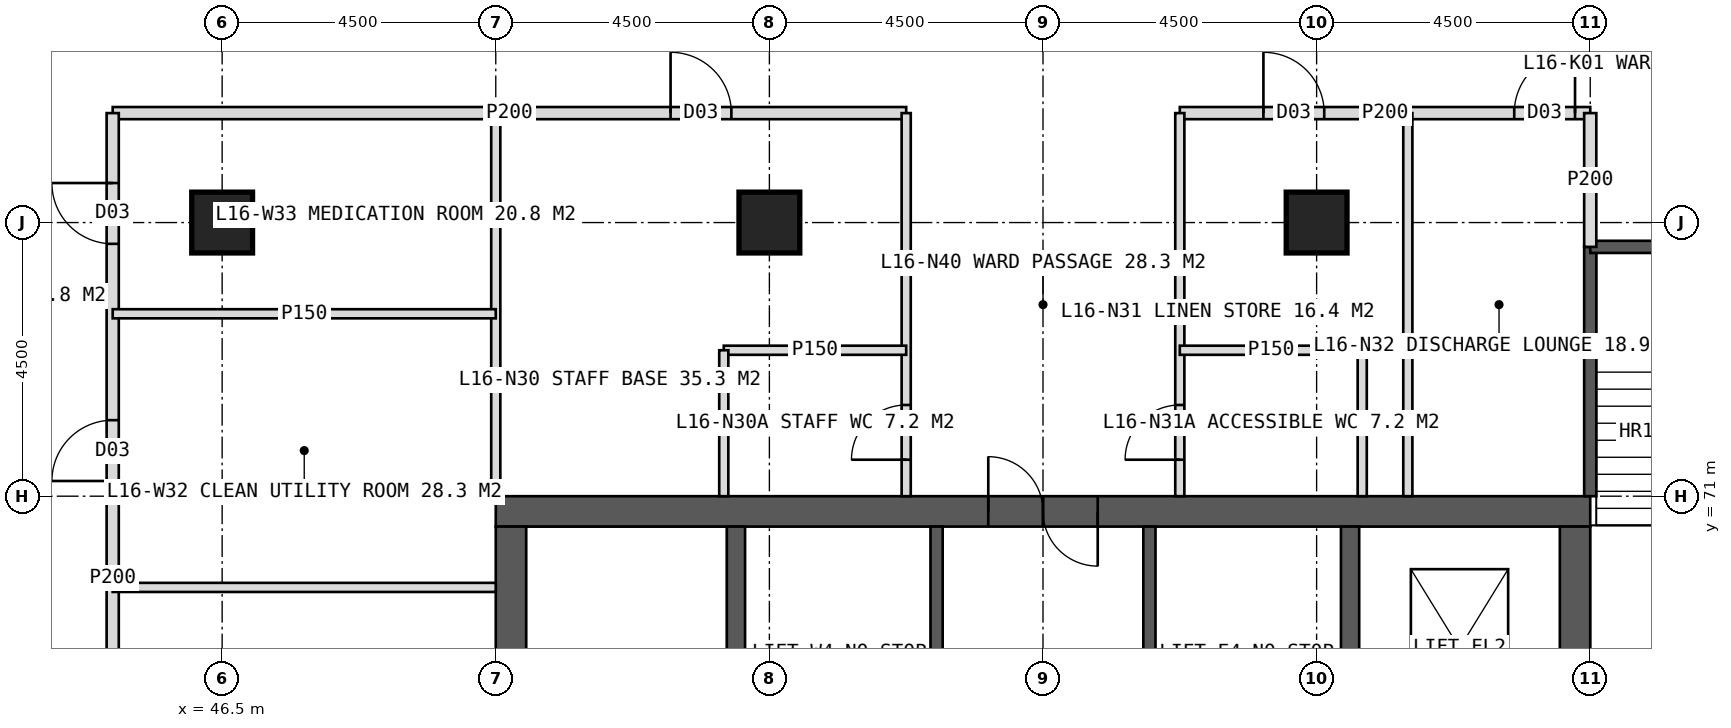
"""IFC4 building model, lengths in metres.
Left out: names, types, materials, properties, quantities, classifications, styles, units other than length and angle.
Written with IfcOpenShell. Run it as: python <this file> out.ifc"""

import sys

from ifc_helpers import new_model, si_unit, direction, frame, frame_2d, origin, origin_2d, place, context, subcontext, project, spatial, rectangle, hollow_rectangle, extrude, element, fill, save


model = new_model("IFC4")
c1 = context("Model", 3, precision=1e-05, world=origin(), true_north=direction((0.0, 1.0)))
c2 = subcontext(c1, "Body", "Model", "MODEL_VIEW")
j1 = project(units=[si_unit("LENGTHUNIT", "METRE"), si_unit("PLANEANGLEUNIT", "RADIAN")], contexts=[c1])
p1 = place(None, origin())
s1 = spatial("IfcSite", under=j1, at=p1, CompositionType="ELEMENT")
p2 = place(p1, origin())
s2 = spatial("IfcBuilding", under=s1, at=p2, CompositionType="ELEMENT")
p3 = place(p2, frame((0.0, 0.0, 71.0)))
s3 = spatial("IfcBuildingStorey", under=s2, at=p3, CompositionType="ELEMENT", Elevation=71.0)
p4 = place(p3, frame((51.0, 70.75, 0.0), z_axis=(0.0, 0.0, 1.0), x_axis=(1.0, 0.0, 0.0)))
e1 = element("IfcWall", 1, at=p4, inside=s3, PredefinedType="SHEAR", context=c2, shape_type="SweptSolid", body=[
    extrude(rectangle(XDim=18.0, YDim=0.5, at=frame_2d((9.0, 0.0))), origin(), (0.0, 0.0, 1.0), 4.0),
])
p5 = place(p4, frame((8.1, 0.0, 0.0)))
e2 = element("IfcOpeningElement", 2, at=p5, cuts=e1, PredefinedType="OPENING", context=c2, shape_type="SweptSolid", body=[
    extrude(rectangle(XDim=1.8, YDim=2.2, at=frame_2d((0.9, 1.1))), frame((0.0, 0.26, 0.0), z_axis=(0.0, -1.0, 0.0), x_axis=(1.0, 0.0, 0.0)), (0.0, 0.0, 1.0), 0.52),
])
p6 = place(p3, frame((51.25, 53.5, 0.0), z_axis=(0.0, 0.0, 1.0), x_axis=(0.0, 1.0, 0.0)))
e3 = element("IfcWall", 3, at=p6, inside=s3, PredefinedType="SHEAR", context=c2, shape_type="SweptSolid", body=[
    extrude(rectangle(XDim=17.0, YDim=0.5, at=frame_2d((8.5, 0.0))), origin(), (0.0, 0.0, 1.0), 4.0),
])
p7 = place(p6, frame((6.0, 0.0, 0.0)))
e4 = element("IfcOpeningElement", 4, at=p7, cuts=e3, PredefinedType="OPENING", context=c2, shape_type="SweptSolid", body=[
    extrude(rectangle(XDim=1.5, YDim=2.2, at=frame_2d((0.75, 1.1))), frame((0.0, 0.26, 0.0), z_axis=(0.0, -1.0, 0.0), x_axis=(1.0, 0.0, 0.0)), (0.0, 0.0, 1.0), 0.52),
])
p8 = place(p3, frame((68.75, 53.5, 0.0), z_axis=(0.0, 0.0, 1.0), x_axis=(0.0, 1.0, 0.0)))
e5 = element("IfcWall", 5, at=p8, inside=s3, PredefinedType="SHEAR", context=c2, shape_type="SweptSolid", body=[
    extrude(rectangle(XDim=17.0, YDim=0.5, at=frame_2d((8.5, 0.0))), origin(), (0.0, 0.0, 1.0), 4.0),
])
p9 = place(p8, frame((9.5, 0.0, 0.0)))
e6 = element("IfcOpeningElement", 6, at=p9, cuts=e5, PredefinedType="OPENING", context=c2, shape_type="SweptSolid", body=[
    extrude(rectangle(XDim=1.5, YDim=2.2, at=frame_2d((0.75, 1.1))), frame((0.0, 0.26, 0.0), z_axis=(0.0, -1.0, 0.0), x_axis=(1.0, 0.0, 0.0)), (0.0, 0.0, 1.0), 0.52),
])
for number, where, z_axis, x_axis in (
    (7, (54.95, 53.5, 0.0), (0.0, 0.0, 1.0), (0.0, 1.0, 0.0)),
    (8, (65.05, 53.5, 0.0), (0.0, 0.0, 1.0), (0.0, 1.0, 0.0)),
):
    element("IfcWall", number, at=place(p3, frame(where, z_axis=z_axis, x_axis=x_axis)), inside=s3, PredefinedType="SHEAR", context=c2, shape_type="SweptSolid", body=[
        extrude(rectangle(XDim=17.0, YDim=0.3, at=frame_2d((8.5, 0.0))), origin(), (0.0, 0.0, 1.0), 4.0),
    ])
p10 = place(p3, frame((58.25, 53.5, 0.0), z_axis=(0.0, 0.0, 1.0), x_axis=(0.0, 1.0, 0.0)))
e9 = element("IfcWall", 9, at=p10, inside=s3, PredefinedType="SHEAR", context=c2, shape_type="SweptSolid", body=[
    extrude(rectangle(XDim=17.0, YDim=0.2, at=frame_2d((8.5, 0.0))), origin(), (0.0, 0.0, 1.0), 4.0),
])
p11 = place(p10, frame((1.375, 0.0, 0.0)))
e10 = element("IfcOpeningElement", 10, at=p11, cuts=e9, PredefinedType="OPENING", context=c2, shape_type="SweptSolid", body=[
    extrude(rectangle(XDim=1.4, YDim=2.2, at=frame_2d((0.7, 1.1))), frame((0.0, 0.11, 0.0), z_axis=(0.0, -1.0, 0.0), x_axis=(1.0, 0.0, 0.0)), (0.0, 0.0, 1.0), 0.22),
])
p12 = place(p10, frame((5.675, 0.0, 0.0)))
e11 = element("IfcOpeningElement", 11, at=p12, cuts=e9, PredefinedType="OPENING", context=c2, shape_type="SweptSolid", body=[
    extrude(rectangle(XDim=1.4, YDim=2.2, at=frame_2d((0.7, 1.1))), frame((0.0, 0.11, 0.0), z_axis=(0.0, -1.0, 0.0), x_axis=(1.0, 0.0, 0.0)), (0.0, 0.0, 1.0), 0.22),
])
p13 = place(p3, frame((61.75, 53.5, 0.0), z_axis=(0.0, 0.0, 1.0), x_axis=(0.0, 1.0, 0.0)))
e12 = element("IfcWall", 12, at=p13, inside=s3, PredefinedType="SHEAR", context=c2, shape_type="SweptSolid", body=[
    extrude(rectangle(XDim=17.0, YDim=0.2, at=frame_2d((8.5, 0.0))), origin(), (0.0, 0.0, 1.0), 4.0),
])
p14 = place(p13, frame((1.375, 0.0, 0.0)))
e13 = element("IfcOpeningElement", 13, at=p14, cuts=e12, PredefinedType="OPENING", context=c2, shape_type="SweptSolid", body=[
    extrude(rectangle(XDim=1.4, YDim=2.2, at=frame_2d((0.7, 1.1))), frame((0.0, 0.11, 0.0), z_axis=(0.0, -1.0, 0.0), x_axis=(1.0, 0.0, 0.0)), (0.0, 0.0, 1.0), 0.22),
])
p15 = place(p13, frame((5.675, 0.0, 0.0)))
e14 = element("IfcOpeningElement", 14, at=p15, cuts=e12, PredefinedType="OPENING", context=c2, shape_type="SweptSolid", body=[
    extrude(rectangle(XDim=1.4, YDim=2.2, at=frame_2d((0.7, 1.1))), frame((0.0, 0.11, 0.0), z_axis=(0.0, -1.0, 0.0), x_axis=(1.0, 0.0, 0.0)), (0.0, 0.0, 1.0), 0.22),
])
for number, where, z_axis, x_axis in (
    (15, (46.5, 75.5, 0.0), (0.0, 0.0, 1.0), (1.0, 0.0, 0.0)),
    (16, (55.5, 75.5, 0.0), (0.0, 0.0, 1.0), (1.0, 0.0, 0.0)),
    (17, (64.5, 75.5, 0.0), (0.0, 0.0, 1.0), (1.0, 0.0, 0.0)),
):
    element("IfcColumn", number, at=place(p3, frame(where, z_axis=z_axis, x_axis=x_axis)), inside=s3, PredefinedType="COLUMN", context=c2, shape_type="SweptSolid", body=[
        extrude(hollow_rectangle(XDim=1.0, YDim=1.0, WallThickness=0.1, at=origin_2d()), origin(), (0.0, 0.0, 1.0), 4.0),
    ])
p16 = place(p3, frame((51.0, 71.0, 0.0), z_axis=(0.0, 0.0, 1.0), x_axis=(0.0, 1.0, 0.0)))
e18 = element("IfcWall", 18, at=p16, inside=s3, PredefinedType="PARTITIONING", context=c2, shape_type="SweptSolid", body=[
    extrude(rectangle(XDim=6.3, YDim=0.15, at=frame_2d((3.15, 0.0))), origin(), (0.0, 0.0, 1.0), 3.75),
])
p17 = place(p3, frame((44.7, 77.3, 0.0), z_axis=(0.0, 0.0, 1.0), x_axis=(1.0, 0.0, 0.0)))
e19 = element("IfcWall", 19, at=p17, inside=s3, PredefinedType="PARTITIONING", context=c2, shape_type="SweptSolid", body=[
    extrude(rectangle(XDim=13.05, YDim=0.2, at=frame_2d((6.525, 0.0))), origin(), (0.0, 0.0, 1.0), 3.75),
])
p18 = place(p17, frame((9.175, 0.0, 0.0)))
e20 = element("IfcOpeningElement", 20, at=p18, cuts=e19, PredefinedType="OPENING", context=c2, shape_type="SweptSolid", body=[
    extrude(rectangle(XDim=1.0, YDim=2.1, at=frame_2d((0.5, 1.05))), frame((0.0, 0.11, 0.0), z_axis=(0.0, -1.0, 0.0), x_axis=(1.0, 0.0, 0.0)), (0.0, 0.0, 1.0), 0.22),
])
p19 = place(p3, frame((62.25, 77.3, 0.0), z_axis=(0.0, 0.0, 1.0), x_axis=(1.0, 0.0, 0.0)))
e21 = element("IfcWall", 21, at=p19, inside=s3, PredefinedType="PARTITIONING", context=c2, shape_type="SweptSolid", body=[
    extrude(rectangle(XDim=6.75, YDim=0.2, at=frame_2d((3.375, 0.0))), origin(), (0.0, 0.0, 1.0), 3.75),
])
p20 = place(p19, frame((1.375, 0.0, 0.0)))
e22 = element("IfcOpeningElement", 22, at=p20, cuts=e21, PredefinedType="OPENING", context=c2, shape_type="SweptSolid", body=[
    extrude(rectangle(XDim=1.0, YDim=2.1, at=frame_2d((0.5, 1.05))), frame((0.0, 0.11, 0.0), z_axis=(0.0, -1.0, 0.0), x_axis=(1.0, 0.0, 0.0)), (0.0, 0.0, 1.0), 0.22),
])
p21 = place(p19, frame((5.5, 0.0, 0.0)))
e23 = element("IfcOpeningElement", 23, at=p21, cuts=e21, PredefinedType="OPENING", context=c2, shape_type="SweptSolid", body=[
    extrude(rectangle(XDim=1.0, YDim=2.1, at=frame_2d((0.5, 1.05))), frame((0.0, 0.11, 0.0), z_axis=(0.0, -1.0, 0.0), x_axis=(1.0, 0.0, 0.0)), (0.0, 0.0, 1.0), 0.22),
])
p22 = place(p3, frame((57.75, 71.0, 0.0), z_axis=(0.0, 0.0, 1.0), x_axis=(0.0, 1.0, 0.0)))
e24 = element("IfcWall", 24, at=p22, inside=s3, PredefinedType="PARTITIONING", context=c2, shape_type="SweptSolid", body=[
    extrude(rectangle(XDim=6.3, YDim=0.15, at=frame_2d((3.15, 0.0))), origin(), (0.0, 0.0, 1.0), 3.75),
])
p23 = place(p22, frame((0.6, 0.0, 0.0)))
e25 = element("IfcOpeningElement", 25, at=p23, cuts=e24, PredefinedType="OPENING", context=c2, shape_type="SweptSolid", body=[
    extrude(rectangle(XDim=0.9, YDim=2.1, at=frame_2d((0.45, 1.05))), frame((0.0, 0.085, 0.0), z_axis=(0.0, -1.0, 0.0), x_axis=(1.0, 0.0, 0.0)), (0.0, 0.0, 1.0), 0.17),
])
p24 = place(p3, frame((62.25, 71.0, 0.0), z_axis=(0.0, 0.0, 1.0), x_axis=(0.0, 1.0, 0.0)))
e26 = element("IfcWall", 26, at=p24, inside=s3, PredefinedType="PARTITIONING", context=c2, shape_type="SweptSolid", body=[
    extrude(rectangle(XDim=6.3, YDim=0.15, at=frame_2d((3.15, 0.0))), origin(), (0.0, 0.0, 1.0), 3.75),
])
p25 = place(p24, frame((0.6, 0.0, 0.0)))
e27 = element("IfcOpeningElement", 27, at=p25, cuts=e26, PredefinedType="OPENING", context=c2, shape_type="SweptSolid", body=[
    extrude(rectangle(XDim=0.9, YDim=2.1, at=frame_2d((0.45, 1.05))), frame((0.0, 0.085, 0.0), z_axis=(0.0, -1.0, 0.0), x_axis=(1.0, 0.0, 0.0)), (0.0, 0.0, 1.0), 0.17),
])
p26 = place(p3, frame((66.0, 71.0, 0.0), z_axis=(0.0, 0.0, 1.0), x_axis=(0.0, 1.0, 0.0)))
e28 = element("IfcWall", 28, at=p26, inside=s3, PredefinedType="PARTITIONING", context=c2, shape_type="SweptSolid", body=[
    extrude(rectangle(XDim=6.3, YDim=0.15, at=frame_2d((3.15, 0.0))), origin(), (0.0, 0.0, 1.0), 3.75),
])
p27 = place(p3, frame((54.75, 73.4, 0.0), z_axis=(0.0, 0.0, 1.0), x_axis=(1.0, 0.0, 0.0)))
e29 = element("IfcWall", 29, at=p27, inside=s3, PredefinedType="PARTITIONING", context=c2, shape_type="SweptSolid", body=[
    extrude(rectangle(XDim=3.0, YDim=0.15, at=frame_2d((1.5, 0.0))), origin(), (0.0, 0.0, 1.0), 3.75),
])
p28 = place(p3, frame((54.75, 71.0, 0.0), z_axis=(0.0, 0.0, 1.0), x_axis=(0.0, 1.0, 0.0)))
e30 = element("IfcWall", 30, at=p28, inside=s3, PredefinedType="PARTITIONING", context=c2, shape_type="SweptSolid", body=[
    extrude(rectangle(XDim=2.4, YDim=0.15, at=frame_2d((1.2, 0.0))), origin(), (0.0, 0.0, 1.0), 3.75),
])
p29 = place(p3, frame((62.25, 73.4, 0.0), z_axis=(0.0, 0.0, 1.0), x_axis=(1.0, 0.0, 0.0)))
e31 = element("IfcWall", 31, at=p29, inside=s3, PredefinedType="PARTITIONING", context=c2, shape_type="SweptSolid", body=[
    extrude(rectangle(XDim=3.0, YDim=0.15, at=frame_2d((1.5, 0.0))), origin(), (0.0, 0.0, 1.0), 3.75),
])
p30 = place(p3, frame((65.25, 71.0, 0.0), z_axis=(0.0, 0.0, 1.0), x_axis=(0.0, 1.0, 0.0)))
e32 = element("IfcWall", 32, at=p30, inside=s3, PredefinedType="PARTITIONING", context=c2, shape_type="SweptSolid", body=[
    extrude(rectangle(XDim=2.4, YDim=0.15, at=frame_2d((1.2, 0.0))), origin(), (0.0, 0.0, 1.0), 3.75),
])
p31 = place(p3, frame((44.7, 62.0, 0.0), z_axis=(0.0, 0.0, 1.0), x_axis=(0.0, 1.0, 0.0)))
e33 = element("IfcWall", 33, at=p31, inside=s3, PredefinedType="PARTITIONING", context=c2, shape_type="SweptSolid", body=[
    extrude(rectangle(XDim=15.3, YDim=0.2, at=frame_2d((7.65, 0.0))), origin(), (0.0, 0.0, 1.0), 3.75),
])
p32 = place(p31, frame((3.25, 0.0, 0.0)))
e34 = element("IfcOpeningElement", 34, at=p32, cuts=e33, PredefinedType="OPENING", context=c2, shape_type="SweptSolid", body=[
    extrude(rectangle(XDim=1.0, YDim=2.1, at=frame_2d((0.5, 1.05))), frame((0.0, 0.11, 0.0), z_axis=(0.0, -1.0, 0.0), x_axis=(1.0, 0.0, 0.0)), (0.0, 0.0, 1.0), 0.22),
])
p33 = place(p31, frame((9.25, 0.0, 0.0)))
e35 = element("IfcOpeningElement", 35, at=p33, cuts=e33, PredefinedType="OPENING", context=c2, shape_type="SweptSolid", body=[
    extrude(rectangle(XDim=1.0, YDim=2.1, at=frame_2d((0.5, 1.05))), frame((0.0, 0.11, 0.0), z_axis=(0.0, -1.0, 0.0), x_axis=(1.0, 0.0, 0.0)), (0.0, 0.0, 1.0), 0.22),
])
p34 = place(p31, frame((13.15, 0.0, 0.0)))
e36 = element("IfcOpeningElement", 36, at=p34, cuts=e33, PredefinedType="OPENING", context=c2, shape_type="SweptSolid", body=[
    extrude(rectangle(XDim=1.0, YDim=2.1, at=frame_2d((0.5, 1.05))), frame((0.0, 0.11, 0.0), z_axis=(0.0, -1.0, 0.0), x_axis=(1.0, 0.0, 0.0)), (0.0, 0.0, 1.0), 0.22),
])
for number, where, z_axis, x_axis in (
    (37, (51.0, 69.5, 0.0), (0.0, 0.0, 1.0), (-1.0, 0.0, 0.0)),
    (38, (51.0, 74.0, 0.0), (0.0, 0.0, 1.0), (-1.0, 0.0, 0.0)),
):
    element("IfcWall", number, at=place(p3, frame(where, z_axis=z_axis, x_axis=x_axis)), inside=s3, PredefinedType="PARTITIONING", context=c2, shape_type="SweptSolid", body=[
        extrude(rectangle(XDim=6.3, YDim=0.15, at=frame_2d((3.15, 0.0))), origin(), (0.0, 0.0, 1.0), 3.75),
    ])
p35 = place(p3, frame((69.0, 71.0, 0.0), z_axis=(0.0, 0.0, 1.0), x_axis=(0.0, 1.0, 0.0)))
e39 = element("IfcWall", 39, at=p35, inside=s3, PredefinedType="SOLIDWALL", context=c2, shape_type="SweptSolid", body=[
    extrude(rectangle(XDim=4.1, YDim=0.2, at=frame_2d((2.05, 0.0))), origin(), (0.0, 0.0, 1.0), 3.75),
])
p36 = place(p3, frame((69.0, 75.1, 0.0), z_axis=(0.0, 0.0, 1.0), x_axis=(1.0, 0.0, 0.0)))
e40 = element("IfcWall", 40, at=p36, inside=s3, PredefinedType="SOLIDWALL", context=c2, shape_type="SweptSolid", body=[
    extrude(rectangle(XDim=3.5, YDim=0.2, at=frame_2d((1.75, 0.0))), origin(), (0.0, 0.0, 1.0), 3.75),
])
p37 = place(p36, frame((1.15, 0.0, 0.0)))
e41 = element("IfcOpeningElement", 41, at=p37, cuts=e40, PredefinedType="OPENING", context=c2, shape_type="SweptSolid", body=[
    extrude(rectangle(XDim=1.2, YDim=2.1, at=frame_2d((0.6, 1.05))), frame((0.0, 0.11, 0.0), z_axis=(0.0, -1.0, 0.0), x_axis=(1.0, 0.0, 0.0)), (0.0, 0.0, 1.0), 0.22),
])
p38 = place(p3, frame((69.0, 75.1, 0.0), z_axis=(0.0, 0.0, 1.0), x_axis=(0.0, 1.0, 0.0)))
e42 = element("IfcWall", 42, at=p38, inside=s3, PredefinedType="PARTITIONING", context=c2, shape_type="SweptSolid", body=[
    extrude(rectangle(XDim=2.2, YDim=0.2, at=frame_2d((1.1, 0.0))), origin(), (0.0, 0.0, 1.0), 3.75),
])
p39 = place(p23, origin())
e43 = element("IfcDoor", 43, at=p39, inside=s3, OperationType="SINGLE_SWING_LEFT", PredefinedType="DOOR", context=c2, shape_type="SweptSolid", body=[
    extrude(rectangle(XDim=0.9, YDim=2.1, at=frame_2d((0.45, 1.05))), frame((0.0, 0.025, 0.0), z_axis=(0.0, -1.0, 0.0), x_axis=(1.0, 0.0, 0.0)), (0.0, 0.0, 1.0), 0.05),
])
fill(e25, e43)
p40 = place(p18, origin())
e44 = element("IfcDoor", 44, at=p40, inside=s3, OperationType="SINGLE_SWING_LEFT", PredefinedType="DOOR", context=c2, shape_type="SweptSolid", body=[
    extrude(rectangle(XDim=1.0, YDim=2.1, at=frame_2d((0.5, 1.05))), frame((0.0, 0.025, 0.0), z_axis=(0.0, -1.0, 0.0), x_axis=(1.0, 0.0, 0.0)), (0.0, 0.0, 1.0), 0.05),
])
fill(e20, e44)
p41 = place(p25, origin())
e45 = element("IfcDoor", 45, at=p41, inside=s3, OperationType="SINGLE_SWING_LEFT", PredefinedType="DOOR", context=c2, shape_type="SweptSolid", body=[
    extrude(rectangle(XDim=0.9, YDim=2.1, at=frame_2d((0.45, 1.05))), frame((0.0, 0.025, 0.0), z_axis=(0.0, -1.0, 0.0), x_axis=(1.0, 0.0, 0.0)), (0.0, 0.0, 1.0), 0.05),
])
fill(e27, e45)
p42 = place(p20, origin())
e46 = element("IfcDoor", 46, at=p42, inside=s3, OperationType="SINGLE_SWING_LEFT", PredefinedType="DOOR", context=c2, shape_type="SweptSolid", body=[
    extrude(rectangle(XDim=1.0, YDim=2.1, at=frame_2d((0.5, 1.05))), frame((0.0, 0.025, 0.0), z_axis=(0.0, -1.0, 0.0), x_axis=(1.0, 0.0, 0.0)), (0.0, 0.0, 1.0), 0.05),
])
fill(e22, e46)
p43 = place(p21, origin())
e47 = element("IfcDoor", 47, at=p43, inside=s3, OperationType="SINGLE_SWING_RIGHT", PredefinedType="DOOR", context=c2, shape_type="SweptSolid", body=[
    extrude(rectangle(XDim=1.0, YDim=2.1, at=frame_2d((0.5, 1.05))), frame((0.0, 0.025, 0.0), z_axis=(0.0, -1.0, 0.0), x_axis=(1.0, 0.0, 0.0)), (0.0, 0.0, 1.0), 0.05),
])
fill(e23, e47)
p44 = place(p33, origin())
e48 = element("IfcDoor", 48, at=p44, inside=s3, OperationType="SINGLE_SWING_LEFT", PredefinedType="DOOR", context=c2, shape_type="SweptSolid", body=[
    extrude(rectangle(XDim=1.0, YDim=2.1, at=frame_2d((0.5, 1.05))), frame((0.0, 0.025, 0.0), z_axis=(0.0, -1.0, 0.0), x_axis=(1.0, 0.0, 0.0)), (0.0, 0.0, 1.0), 0.05),
])
fill(e35, e48)
p45 = place(p34, origin())
e49 = element("IfcDoor", 49, at=p45, inside=s3, OperationType="SINGLE_SWING_RIGHT", PredefinedType="DOOR", context=c2, shape_type="SweptSolid", body=[
    extrude(rectangle(XDim=1.0, YDim=2.1, at=frame_2d((0.5, 1.05))), frame((0.0, 0.025, 0.0), z_axis=(0.0, -1.0, 0.0), x_axis=(1.0, 0.0, 0.0)), (0.0, 0.0, 1.0), 0.05),
])
fill(e36, e49)
p46 = place(p5, origin())
e50 = element("IfcDoor", 50, at=p46, inside=s3, OperationType="DOUBLE_DOOR_SINGLE_SWING", PredefinedType="DOOR", context=c2, shape_type="SweptSolid", body=[
    extrude(rectangle(XDim=1.8, YDim=2.2, at=frame_2d((0.9, 1.1))), frame((0.0, 0.025, 0.0), z_axis=(0.0, -1.0, 0.0), x_axis=(1.0, 0.0, 0.0)), (0.0, 0.0, 1.0), 0.05),
])
fill(e2, e50)
save(model, sys.argv[1])
